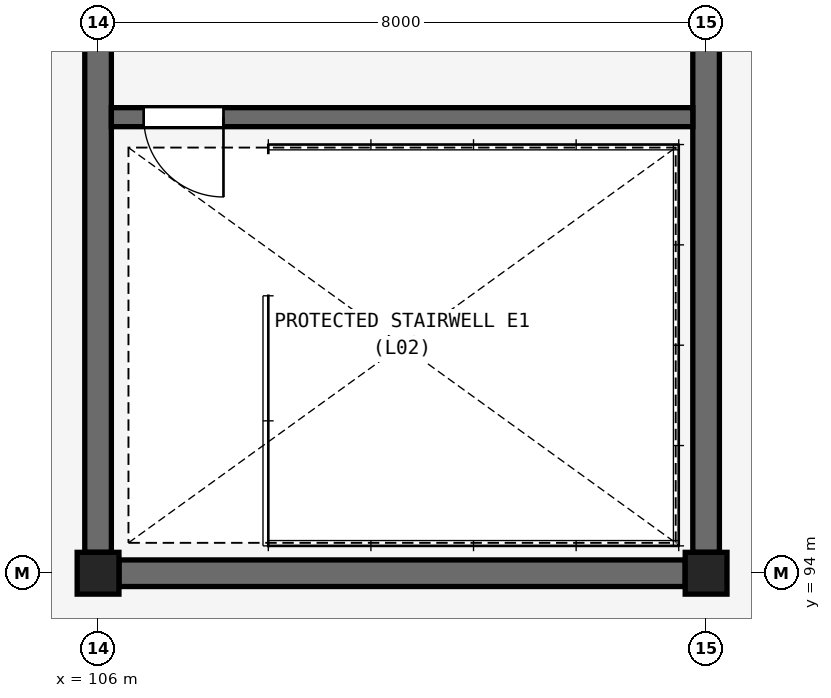
"""IFC4 building model, lengths in metres.
Left out: names, types, materials, properties, quantities, classifications, styles, units other than length and angle.
Written with IfcOpenShell. Run it as: python <this file> out.ifc"""

import sys

from ifc_helpers import new_model, si_unit, direction, frame, frame_2d, origin, origin_2d, place, context, subcontext, project, spatial, rectangle, circle, extrude, element, fill, save


model = new_model("IFC4")
c1 = context("Model", 3, precision=1e-05, world=origin(), true_north=direction((0.0, 1.0)))
c2 = subcontext(c1, "Body", "Model", "MODEL_VIEW")
j1 = project(units=[si_unit("LENGTHUNIT", "METRE"), si_unit("PLANEANGLEUNIT", "RADIAN")], contexts=[c1])
p1 = place(None, origin())
s1 = spatial("IfcSite", under=j1, at=p1, CompositionType="ELEMENT")
p2 = place(p1, origin())
s2 = spatial("IfcBuilding", under=s1, at=p2, CompositionType="ELEMENT")
p3 = place(p2, frame((0.0, 0.0, 10.8)))
s3 = spatial("IfcBuildingStorey", under=s2, at=p3, CompositionType="ELEMENT", Elevation=10.8)
for number, where, z_axis, x_axis in (
    (1, (106.0, 94.0, 0.0), (0.0, 0.0, 1.0), (1.0, 0.0, 0.0)),
    (2, (114.0, 94.0, 0.0), (0.0, 0.0, 1.0), (1.0, 0.0, 0.0)),
):
    element("IfcColumn", number, at=place(p3, frame(where, z_axis=z_axis, x_axis=x_axis)), inside=s3, PredefinedType="COLUMN", context=c2, shape_type="SweptSolid", body=[
        extrude(circle(Radius=0.275, at=origin_2d()), origin(), (0.0, 0.0, 1.0), 4.2),
    ])
for number, where, z_axis, x_axis in (
    (3, (106.275, 94.0, 0.0), (0.0, 0.0, 1.0), (1.0, 0.0, 0.0)),
    (4, (106.0, 94.275, 0.0), (0.0, 0.0, 1.0), (0.0, 1.0, 0.0)),
    (5, (114.0, 94.275, 0.0), (0.0, 0.0, 1.0), (0.0, 1.0, 0.0)),
):
    element("IfcWall", number, at=place(p3, frame(where, z_axis=z_axis, x_axis=x_axis)), inside=s3, PredefinedType="SHEAR", context=c2, shape_type="SweptSolid", body=[
        extrude(rectangle(XDim=7.45, YDim=0.35, at=frame_2d((3.725, 0.0))), origin(), (0.0, 0.0, 1.0), 3.98),
    ])
p4 = place(p3, frame((106.175, 100.0, 0.0), z_axis=(0.0, 0.0, 1.0), x_axis=(1.0, 0.0, 0.0)))
e6 = element("IfcWall", 6, at=p4, inside=s3, PredefinedType="SOLIDWALL", context=c2, shape_type="SweptSolid", body=[
    extrude(rectangle(XDim=7.65, YDim=0.25, at=frame_2d((3.825, 0.0))), origin(), (0.0, 0.0, 1.0), 3.98),
])
p5 = place(p4, frame((0.425, 0.0, 0.0)))
e7 = element("IfcOpeningElement", 7, at=p5, cuts=e6, PredefinedType="OPENING", context=c2, shape_type="SweptSolid", body=[
    extrude(rectangle(XDim=1.05, YDim=2.2, at=frame_2d((0.525, 1.1))), frame((0.0, 0.135, 0.0), z_axis=(0.0, -1.0, 0.0), x_axis=(1.0, 0.0, 0.0)), (0.0, 0.0, 1.0), 0.27),
])
p6 = place(p5, frame((1.05, 0.0, 0.0), z_axis=(0.0, 0.0, 1.0), x_axis=(-1.0, 0.0, 0.0)))
e8 = element("IfcDoor", 8, at=p6, inside=s3, OperationType="SINGLE_SWING_RIGHT", PredefinedType="DOOR", context=c2, shape_type="SweptSolid", body=[
    extrude(rectangle(XDim=1.05, YDim=2.2, at=frame_2d((0.525, 1.1))), frame((0.0, 0.025, 0.0), z_axis=(0.0, -1.0, 0.0), x_axis=(1.0, 0.0, 0.0)), (0.0, 0.0, 1.0), 0.05),
])
fill(e7, e8)
save(model, sys.argv[1])
